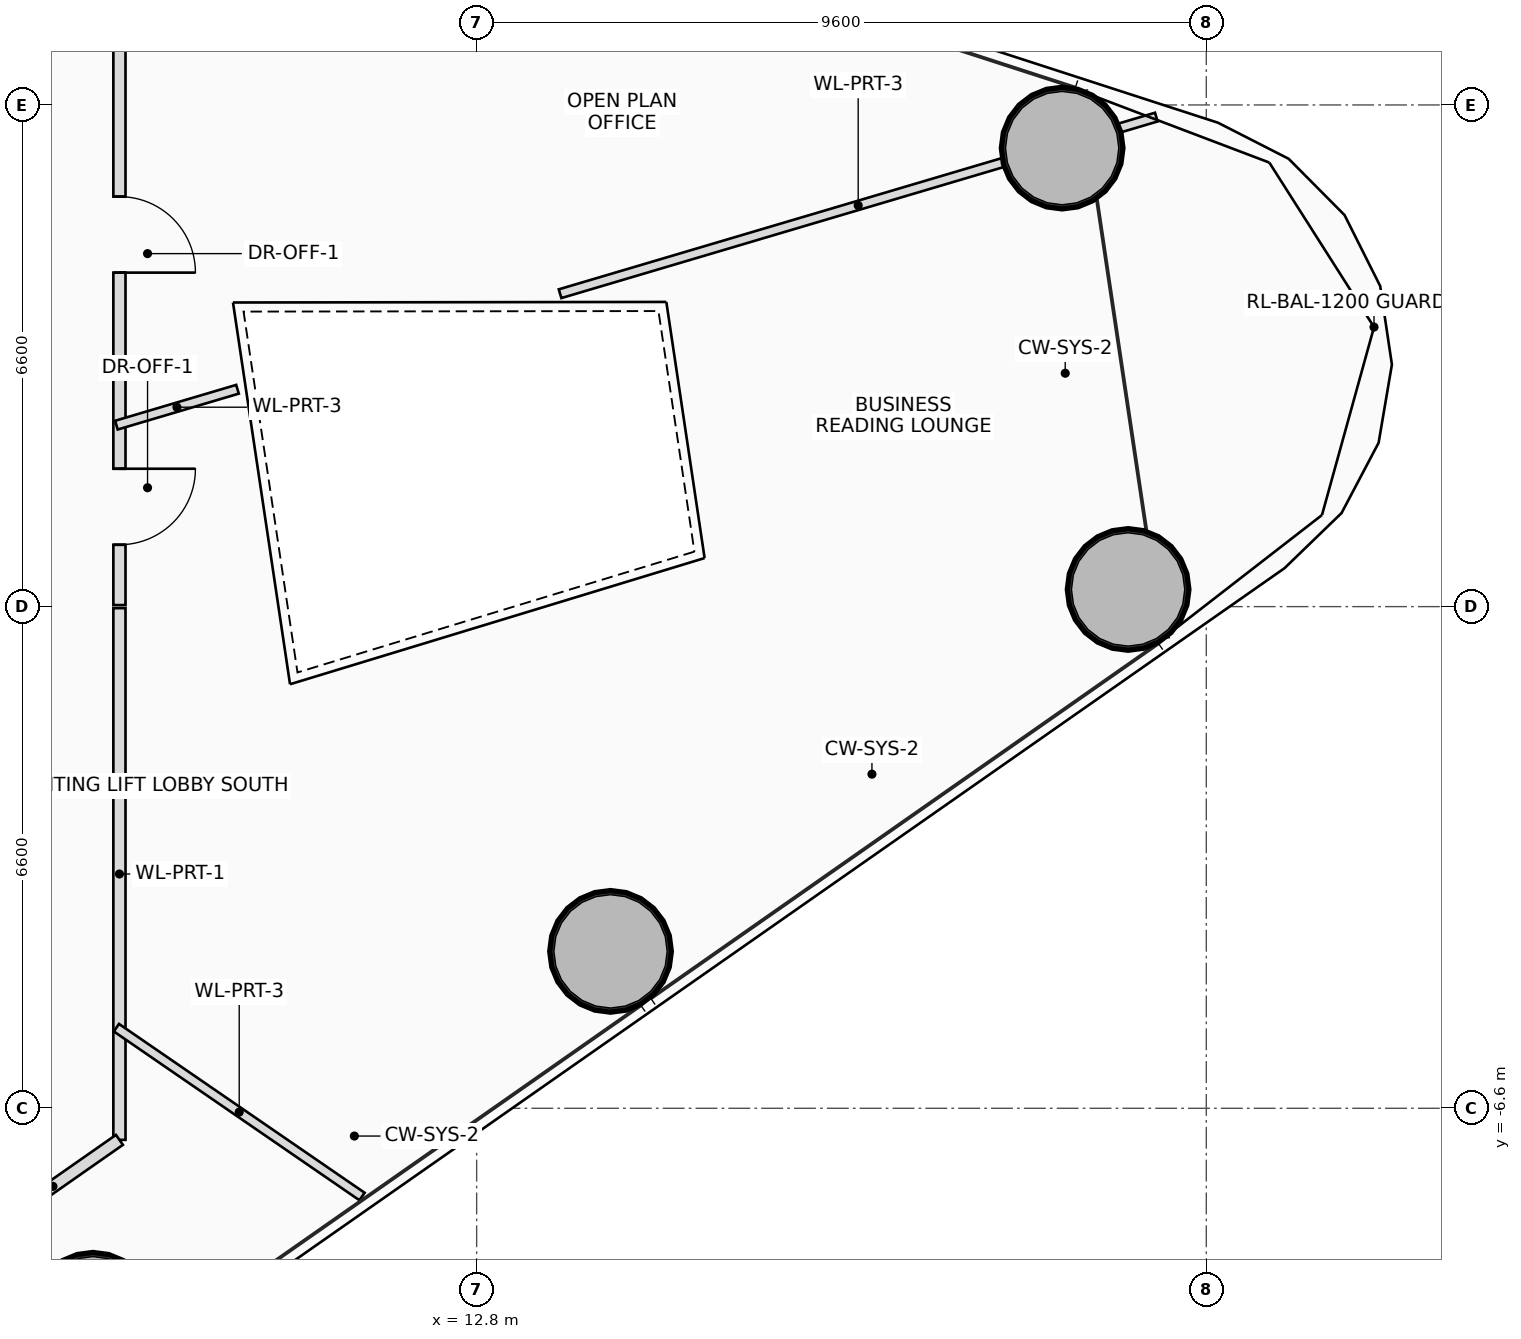
"""IFC4 building model, lengths in metres.
Left out: names, types, materials, properties, quantities, classifications, styles, units other than length and angle.
Written with IfcOpenShell. Run it as: python <this file> out.ifc"""

import sys

from ifc_helpers import new_model, si_unit, direction, frame, frame_2d, origin, origin_2d, place, context, subcontext, project, spatial, rectangle, hollow_circle, extrude, source, transform, mapped, element, fill, save


model = new_model("IFC4")
c1 = context("Model", 3, precision=1e-05, world=origin(), true_north=direction((0.0, 1.0)))
c2 = subcontext(c1, "Body", "Model", "MODEL_VIEW")
j1 = project(units=[si_unit("LENGTHUNIT", "METRE"), si_unit("PLANEANGLEUNIT", "RADIAN")], contexts=[c1])
p1 = place(None, origin())
s1 = spatial("IfcSite", under=j1, at=p1, CompositionType="ELEMENT")
p2 = place(p1, origin())
s2 = spatial("IfcBuilding", under=s1, at=p2, CompositionType="ELEMENT")
p3 = place(p2, frame((0.0, 0.0, 69.8)))
s3 = spatial("IfcBuildingStorey", under=s2, at=p3, CompositionType="ELEMENT", Elevation=69.8)
m1 = source(origin(), c2, "Body", "SweptSolid", [
    extrude(hollow_circle(Radius=0.8, WallThickness=0.055, at=origin_2d()), origin(), (0.0, 0.0, 1.0), 3.75),
])
for number, where, z_axis, x_axis in (
    (1, (7.752, -9.297, 0.0), (0.0, 0.0, 1.0), (1.0, 0.0, 0.0)),
    (2, (14.562, -4.535, 0.0), (0.0, 0.0, 1.0), (1.0, 0.0, 0.0)),
    (3, (21.371, 0.226, 0.0), (0.0, 0.0, 1.0), (1.0, 0.0, 0.0)),
    (4, (20.503, 6.032, 0.0), (0.0, 0.0, 1.0), (1.0, 0.0, 0.0)),
):
    element("IfcColumn", number, at=place(p3, frame(where, z_axis=z_axis, x_axis=x_axis)), inside=s3, PredefinedType="COLUMN", context=c2, shape_type="MappedRepresentation", body=[
        mapped(m1, transform((0.0, 0.0, 0.0), scale=1.0)),
    ])
p4 = place(p3, frame((8.1, 7.55, 0.0), z_axis=(0.0, 0.0, 1.0), x_axis=(0.0, -1.0, 0.0)))
e5 = element("IfcWall", 5, at=p4, inside=s3, PredefinedType="PARTITIONING", context=c2, shape_type="SweptSolid", body=[
    extrude(rectangle(XDim=7.53, YDim=0.16, at=frame_2d((3.765, 0.0))), origin(), (0.0, 0.0, 1.0), 2.85),
])
p5 = place(p4, frame((2.156, 0.0, 0.0)))
e6 = element("IfcOpeningElement", 6, at=p5, cuts=e5, PredefinedType="OPENING", context=c2, shape_type="SweptSolid", body=[
    extrude(rectangle(XDim=1.0, YDim=2.25, at=frame_2d((0.5, 1.125))), frame((0.0, 0.09, 0.0), z_axis=(0.0, -1.0, 0.0), x_axis=(1.0, 0.0, 0.0)), (0.0, 0.0, 1.0), 0.18),
])
p6 = place(p4, frame((5.736, 0.0, 0.0)))
e7 = element("IfcOpeningElement", 7, at=p6, cuts=e5, PredefinedType="OPENING", context=c2, shape_type="SweptSolid", body=[
    extrude(rectangle(XDim=1.0, YDim=2.25, at=frame_2d((0.5, 1.125))), frame((0.0, 0.09, 0.0), z_axis=(0.0, -1.0, 0.0), x_axis=(1.0, 0.0, 0.0)), (0.0, 0.0, 1.0), 0.18),
])
p7 = place(p3, frame((8.1, -0.02, 0.0), z_axis=(0.0, 0.0, 1.0), x_axis=(0.0, -1.0, 0.0)))
e8 = element("IfcWall", 8, at=p7, inside=s3, PredefinedType="PARTITIONING", context=c2, shape_type="SweptSolid", body=[
    extrude(rectangle(XDim=6.995, YDim=0.16, at=frame_2d((3.498, 0.0))), origin(), (0.0, 0.0, 1.0), 2.85),
])
p8 = place(p3, frame((8.1, -7.015, 0.0), z_axis=(0.0, 0.0, 1.0), x_axis=(-0.81953260104, -0.573032560883, 0.0)))
e9 = element("IfcWall", 9, at=p8, inside=s3, PredefinedType="PARTITIONING", context=c2, shape_type="SweptSolid", body=[
    extrude(rectangle(XDim=2.135, YDim=0.16, at=frame_2d((1.068, 0.0))), origin(), (0.0, 0.0, 1.0), 2.85),
])
p9 = place(p3, frame((8.06, -5.54, 0.0), z_axis=(0.0, 0.0, 1.0), x_axis=(0.824103676806, -0.566438990426, 0.0)))
e10 = element("IfcWall", 10, at=p9, inside=s3, PredefinedType="PARTITIONING", context=c2, shape_type="SweptSolid", body=[
    extrude(rectangle(XDim=3.922, YDim=0.12, at=frame_2d((1.961, 0.0))), origin(), (0.0, 0.0, 1.0), 3.01),
])
p10 = place(p3, frame((8.06, 2.387, 0.0), z_axis=(0.0, 0.0, 1.0), x_axis=(0.958783289971, 0.28413835164, 0.0)))
e11 = element("IfcWall", 11, at=p10, inside=s3, PredefinedType="PARTITIONING", context=c2, shape_type="SweptSolid", body=[
    extrude(rectangle(XDim=1.662, YDim=0.12, at=frame_2d((0.831, 0.0))), origin(), (0.0, 0.0, 1.0), 3.21),
])
p11 = place(p3, frame((13.897, 4.117, 0.0), z_axis=(0.0, 0.0, 1.0), x_axis=(0.958827308203, 0.283989776303, 0.0)))
e12 = element("IfcWall", 12, at=p11, inside=s3, PredefinedType="PARTITIONING", context=c2, shape_type="SweptSolid", body=[
    extrude(rectangle(XDim=8.182, YDim=0.12, at=frame_2d((4.091, 0.0))), origin(), (0.0, 0.0, 1.0), 2.85),
])
p12 = place(p5, origin())
e13 = element("IfcDoor", 13, at=p12, inside=s3, OperationType="SINGLE_SWING_RIGHT", PredefinedType="DOOR", context=c2, shape_type="SweptSolid", body=[
    extrude(rectangle(XDim=1.0, YDim=2.25, at=frame_2d((0.5, 1.125))), frame((0.0, 0.025, 0.0), z_axis=(0.0, -1.0, 0.0), x_axis=(1.0, 0.0, 0.0)), (0.0, 0.0, 1.0), 0.05),
])
fill(e6, e13)
p13 = place(p6, origin())
e14 = element("IfcDoor", 14, at=p13, inside=s3, OperationType="SINGLE_SWING_LEFT", PredefinedType="DOOR", context=c2, shape_type="SweptSolid", body=[
    extrude(rectangle(XDim=1.0, YDim=2.25, at=frame_2d((0.5, 1.125))), frame((0.0, 0.025, 0.0), z_axis=(0.0, -1.0, 0.0), x_axis=(1.0, 0.0, 0.0)), (0.0, 0.0, 1.0), 0.05),
])
fill(e7, e14)
save(model, sys.argv[1])
